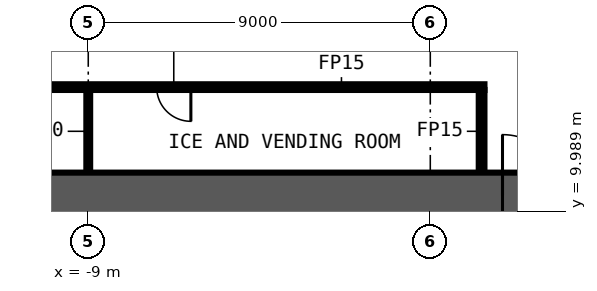
"""IFC4 building model, lengths in metres.
Left out: names, types, materials, properties, quantities, classifications, styles, units other than length and angle.
Written with IfcOpenShell. Run it as: python <this file> out.ifc"""

import sys

from ifc_helpers import new_model, si_unit, direction, frame, frame_2d, origin, place, context, subcontext, project, spatial, rectangle, extrude, element, fill, save


model = new_model("IFC4")
c1 = context("Model", 3, precision=1e-05, world=origin(), true_north=direction((0.0, 1.0)))
c2 = subcontext(c1, "Body", "Model", "MODEL_VIEW")
j1 = project(units=[si_unit("LENGTHUNIT", "METRE"), si_unit("PLANEANGLEUNIT", "RADIAN")], contexts=[c1])
p1 = place(None, origin())
s1 = spatial("IfcSite", under=j1, at=p1, CompositionType="ELEMENT")
p2 = place(p1, origin())
s2 = spatial("IfcBuilding", under=s1, at=p2, CompositionType="ELEMENT")
p3 = place(p2, frame((0.0, 0.0, 77.3)))
s3 = spatial("IfcBuildingStorey", under=s2, at=p3, CompositionType="ELEMENT", Elevation=77.3)
p4 = place(p3, frame((1.425, 13.25, 0.0), z_axis=(0.0, 0.0, 1.0), x_axis=(-1.0, 0.0, 0.0)))
e1 = element("IfcWall", 1, at=p4, inside=s3, PredefinedType="PARTITIONING", context=c2, shape_type="SweptSolid", body=[
    extrude(rectangle(XDim=17.75, YDim=0.15, at=frame_2d((8.875, 0.0))), origin(), (0.0, 0.0, 1.0), 3.3),
])
p5 = place(p4, frame((7.725, 0.0, 0.0)))
e2 = element("IfcOpeningElement", 2, at=p5, cuts=e1, PredefinedType="OPENING", context=c2, shape_type="SweptSolid", body=[
    extrude(rectangle(XDim=0.9, YDim=2.1, at=frame_2d((0.45, 1.05))), frame((0.0, 0.085, 0.0), z_axis=(0.0, -1.0, 0.0), x_axis=(1.0, 0.0, 0.0)), (0.0, 0.0, 1.0), 0.17),
])
p6 = place(p4, frame((13.6, 0.0, 0.0)))
e3 = element("IfcOpeningElement", 3, at=p6, cuts=e1, PredefinedType="OPENING", context=c2, shape_type="SweptSolid", body=[
    extrude(rectangle(XDim=0.9, YDim=2.1, at=frame_2d((0.45, 1.05))), frame((0.0, 0.085, 0.0), z_axis=(0.0, -1.0, 0.0), x_axis=(1.0, 0.0, 0.0)), (0.0, 0.0, 1.0), 0.17),
])
p7 = place(p3, frame((1.35, 11.0, 0.0), z_axis=(0.0, 0.0, 1.0), x_axis=(0.0, 1.0, 0.0)))
e4 = element("IfcWall", 4, at=p7, inside=s3, PredefinedType="PARTITIONING", context=c2, shape_type="SweptSolid", body=[
    extrude(rectangle(XDim=2.175, YDim=0.15, at=frame_2d((1.087, 0.0))), origin(), (0.0, 0.0, 1.0), 3.3),
])
p8 = place(p3, frame((-9.0, 11.0, 0.0), z_axis=(0.0, 0.0, 1.0), x_axis=(0.0, 1.0, 0.0)))
e5 = element("IfcWall", 5, at=p8, inside=s3, PredefinedType="PARTITIONING", context=c2, shape_type="SweptSolid", body=[
    extrude(rectangle(XDim=2.175, YDim=0.1, at=frame_2d((1.087, 0.0))), origin(), (0.0, 0.0, 1.0), 3.3),
])
p9 = place(p3, frame((-14.0, 10.4, 0.0), z_axis=(0.0, 0.0, 1.0), x_axis=(1.0, 0.0, 0.0)))
e6 = element("IfcWall", 6, at=p9, inside=s3, PredefinedType="SHEAR", context=c2, shape_type="SweptSolid", body=[
    extrude(rectangle(XDim=28.0, YDim=1.2, at=frame_2d((14.0, 0.0))), origin(), (0.0, 0.0, 1.0), 3.3),
])
p10 = place(p9, frame((15.9, 0.0, 0.0)))
e7 = element("IfcOpeningElement", 7, at=p10, cuts=e6, PredefinedType="OPENING", context=c2, shape_type="SweptSolid", body=[
    extrude(rectangle(XDim=1.6, YDim=2.1, at=frame_2d((0.8, 1.05))), frame((0.0, 0.61, 0.0), z_axis=(0.0, -1.0, 0.0), x_axis=(1.0, 0.0, 0.0)), (0.0, 0.0, 1.0), 1.22),
])
p11 = place(p5, origin())
e8 = element("IfcDoor", 8, at=p11, inside=s3, OperationType="SINGLE_SWING_LEFT", PredefinedType="DOOR", context=c2, shape_type="SweptSolid", body=[
    extrude(rectangle(XDim=0.9, YDim=2.1, at=frame_2d((0.45, 1.05))), frame((0.0, 0.025, 0.0), z_axis=(0.0, -1.0, 0.0), x_axis=(1.0, 0.0, 0.0)), (0.0, 0.0, 1.0), 0.05),
])
fill(e2, e8)
p12 = place(p10, origin())
e9 = element("IfcDoor", 9, at=p12, inside=s3, OperationType="DOUBLE_DOOR_SINGLE_SWING", PredefinedType="DOOR", context=c2, shape_type="SweptSolid", body=[
    extrude(rectangle(XDim=1.6, YDim=2.1, at=frame_2d((0.8, 1.05))), frame((0.0, 0.025, 0.0), z_axis=(0.0, -1.0, 0.0), x_axis=(1.0, 0.0, 0.0)), (0.0, 0.0, 1.0), 0.05),
])
fill(e7, e9)
save(model, sys.argv[1])
